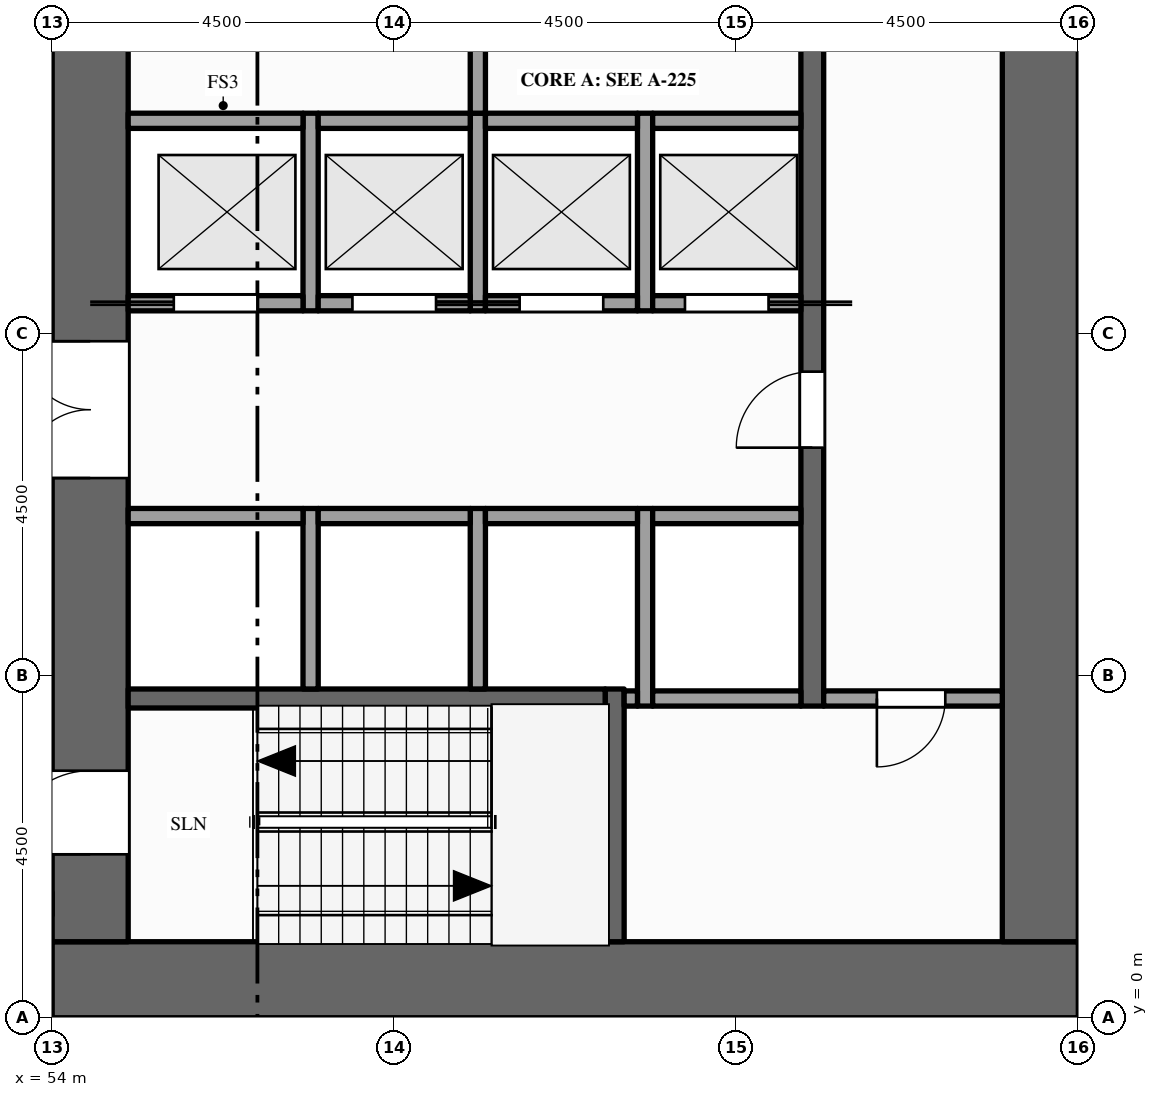
"""IFC4 building model, lengths in metres.
Left out: names, types, materials, properties, quantities, classifications, styles, units other than length and angle.
Written with IfcOpenShell. Run it as: python <this file> out.ifc"""

import sys

from ifc_helpers import new_model, si_unit, direction, frame, frame_2d, origin, place, context, subcontext, project, spatial, rectangle, extrude, element, fill, save


model = new_model("IFC4")
c1 = context("Model", 3, precision=1e-05, world=origin(), true_north=direction((0.0, 1.0)))
c2 = subcontext(c1, "Body", "Model", "MODEL_VIEW")
j1 = project(units=[si_unit("LENGTHUNIT", "METRE"), si_unit("PLANEANGLEUNIT", "RADIAN")], contexts=[c1])
p1 = place(None, origin())
s1 = spatial("IfcSite", under=j1, at=p1, CompositionType="ELEMENT")
p2 = place(p1, origin())
s2 = spatial("IfcBuilding", under=s1, at=p2, CompositionType="ELEMENT")
p3 = place(p2, frame((0.0, 0.0, 139.0)))
s3 = spatial("IfcBuildingStorey", under=s2, at=p3, CompositionType="ELEMENT", Elevation=139.0)
p4 = place(p3, frame((67.5, 0.5, -0.15), z_axis=(0.0, 0.0, 1.0), x_axis=(-1.0, 0.0, 0.0)))
e1 = element("IfcWall", 1, at=p4, inside=s3, PredefinedType="SHEAR", context=c2, shape_type="SweptSolid", body=[
    extrude(rectangle(XDim=13.5, YDim=1.0, at=frame_2d((6.75, 0.0))), origin(), (0.0, 0.0, 1.0), 4.0),
])
p5 = place(p3, frame((54.5, 1.0, -0.15), z_axis=(0.0, 0.0, 1.0), x_axis=(0.0, 1.0, 0.0)))
e2 = element("IfcWall", 2, at=p5, inside=s3, PredefinedType="SHEAR", context=c2, shape_type="SweptSolid", body=[
    extrude(rectangle(XDim=20.5, YDim=1.0, at=frame_2d((10.25, 0.0))), origin(), (0.0, 0.0, 1.0), 4.0),
])
p6 = place(p5, frame((6.1, 0.0, 0.15)))
e3 = element("IfcOpeningElement", 3, at=p6, cuts=e2, PredefinedType="OPENING", context=c2, shape_type="SweptSolid", body=[
    extrude(rectangle(XDim=1.8, YDim=2.1, at=frame_2d((0.9, 1.05))), frame((0.0, 0.51, 0.0), z_axis=(0.0, -1.0, 0.0), x_axis=(1.0, 0.0, 0.0)), (0.0, 0.0, 1.0), 1.02),
])
p7 = place(p5, frame((12.15, 0.0, 0.15)))
e4 = element("IfcOpeningElement", 4, at=p7, cuts=e2, PredefinedType="OPENING", context=c2, shape_type="SweptSolid", body=[
    extrude(rectangle(XDim=1.1, YDim=2.1, at=frame_2d((0.55, 1.05))), frame((0.0, 0.51, 0.0), z_axis=(0.0, -1.0, 0.0), x_axis=(1.0, 0.0, 0.0)), (0.0, 0.0, 1.0), 1.02),
])
p8 = place(p5, frame((1.15, 0.0, 0.15)))
e5 = element("IfcOpeningElement", 5, at=p8, cuts=e2, PredefinedType="OPENING", context=c2, shape_type="SweptSolid", body=[
    extrude(rectangle(XDim=1.1, YDim=2.1, at=frame_2d((0.55, 1.05))), frame((0.0, 0.51, 0.0), z_axis=(0.0, -1.0, 0.0), x_axis=(1.0, 0.0, 0.0)), (0.0, 0.0, 1.0), 1.02),
])
p9 = place(p5, frame((18.35, 0.0, 0.15)))
e6 = element("IfcOpeningElement", 6, at=p9, cuts=e2, PredefinedType="OPENING", context=c2, shape_type="SweptSolid", body=[
    extrude(rectangle(XDim=1.1, YDim=2.1, at=frame_2d((0.55, 1.05))), frame((0.0, 0.51, 0.0), z_axis=(0.0, -1.0, 0.0), x_axis=(1.0, 0.0, 0.0)), (0.0, 0.0, 1.0), 1.02),
])
p10 = place(p3, frame((67.0, 1.0, -0.15), z_axis=(0.0, 0.0, 1.0), x_axis=(0.0, 1.0, 0.0)))
e7 = element("IfcWall", 7, at=p10, inside=s3, PredefinedType="SHEAR", context=c2, shape_type="SweptSolid", body=[
    extrude(rectangle(XDim=20.5, YDim=1.0, at=frame_2d((10.25, 0.0))), origin(), (0.0, 0.0, 1.0), 4.0),
])
p11 = place(p3, frame((57.4, 4.325, 0.0), z_axis=(0.0, 0.0, 1.0), x_axis=(0.0, 1.0, 0.0)))
e8 = element("IfcWall", 8, at=p11, inside=s3, PredefinedType="SOLIDWALL", context=c2, shape_type="SweptSolid", body=[
    extrude(rectangle(XDim=2.375, YDim=0.2, at=frame_2d((1.188, 0.0))), origin(), (0.0, 0.0, 1.0), 3.85),
])
p12 = place(p3, frame((57.4, 9.3, 0.0), z_axis=(0.0, 0.0, 1.0), x_axis=(0.0, 1.0, 0.0)))
e9 = element("IfcWall", 9, at=p12, inside=s3, PredefinedType="SOLIDWALL", context=c2, shape_type="SweptSolid", body=[
    extrude(rectangle(XDim=2.6, YDim=0.2, at=frame_2d((1.3, 0.0))), origin(), (0.0, 0.0, 1.0), 3.85),
])
p13 = place(p3, frame((59.6, 4.325, 0.0), z_axis=(0.0, 0.0, 1.0), x_axis=(0.0, 1.0, 0.0)))
e10 = element("IfcWall", 10, at=p13, inside=s3, PredefinedType="SOLIDWALL", context=c2, shape_type="SweptSolid", body=[
    extrude(rectangle(XDim=2.375, YDim=0.2, at=frame_2d((1.188, 0.0))), origin(), (0.0, 0.0, 1.0), 3.85),
])
p14 = place(p3, frame((59.6, 9.3, 0.0), z_axis=(0.0, 0.0, 1.0), x_axis=(0.0, 1.0, 0.0)))
e11 = element("IfcWall", 11, at=p14, inside=s3, PredefinedType="SOLIDWALL", context=c2, shape_type="SweptSolid", body=[
    extrude(rectangle(XDim=2.6, YDim=0.2, at=frame_2d((1.3, 0.0))), origin(), (0.0, 0.0, 1.0), 3.85),
])
p15 = place(p3, frame((59.6, 11.9, 0.0), z_axis=(0.0, 0.0, 1.0), x_axis=(0.0, 1.0, 0.0)))
e12 = element("IfcWall", 12, at=p15, inside=s3, PredefinedType="PARTITIONING", context=c2, shape_type="SweptSolid", body=[
    extrude(rectangle(XDim=3.6, YDim=0.2, at=frame_2d((1.8, 0.0))), origin(), (0.0, 0.0, 1.0), 3.85),
])
p16 = place(p15, frame((1.3, 0.0, 0.0)))
e13 = element("IfcOpeningElement", 13, at=p16, cuts=e12, PredefinedType="OPENING", context=c2, shape_type="SweptSolid", body=[
    extrude(rectangle(XDim=1.0, YDim=2.1, at=frame_2d((0.5, 1.05))), frame((0.0, 0.11, 0.0), z_axis=(0.0, -1.0, 0.0), x_axis=(1.0, 0.0, 0.0)), (0.0, 0.0, 1.0), 0.22),
])
p17 = place(p3, frame((61.4, 1.0, 0.0), z_axis=(0.0, 0.0, 1.0), x_axis=(0.0, 1.0, 0.0)))
e14 = element("IfcWall", 14, at=p17, inside=s3, PredefinedType="SHEAR", context=c2, shape_type="SweptSolid", body=[
    extrude(rectangle(XDim=3.325, YDim=0.25, at=frame_2d((1.663, 0.0))), origin(), (0.0, 0.0, 1.0), 3.85),
])
for number, where, z_axis, x_axis in (
    (15, (61.8, 4.1, 0.0), (0.0, 0.0, 1.0), (0.0, 1.0, 0.0)),
    (16, (61.8, 9.3, 0.0), (0.0, 0.0, 1.0), (0.0, 1.0, 0.0)),
):
    element("IfcWall", number, at=place(p3, frame(where, z_axis=z_axis, x_axis=x_axis)), inside=s3, PredefinedType="SOLIDWALL", context=c2, shape_type="SweptSolid", body=[
        extrude(rectangle(XDim=2.6, YDim=0.2, at=frame_2d((1.3, 0.0))), origin(), (0.0, 0.0, 1.0), 3.85),
    ])
p18 = place(p3, frame((64.0, 4.1, 0.0), z_axis=(0.0, 0.0, 1.0), x_axis=(0.0, 1.0, 0.0)))
e17 = element("IfcWall", 17, at=p18, inside=s3, PredefinedType="SHEAR", context=c2, shape_type="SweptSolid", body=[
    extrude(rectangle(XDim=14.5, YDim=0.3, at=frame_2d((7.25, 0.0))), origin(), (0.0, 0.0, 1.0), 3.85),
])
p19 = place(p18, frame((3.4, 0.0, 0.0)))
e18 = element("IfcOpeningElement", 18, at=p19, cuts=e17, PredefinedType="OPENING", context=c2, shape_type="SweptSolid", body=[
    extrude(rectangle(XDim=1.0, YDim=2.1, at=frame_2d((0.5, 1.05))), frame((0.0, 0.16, 0.0), z_axis=(0.0, -1.0, 0.0), x_axis=(1.0, 0.0, 0.0)), (0.0, 0.0, 1.0), 0.32),
])
p20 = place(p18, frame((9.1, 0.0, 0.0)))
e19 = element("IfcOpeningElement", 19, at=p20, cuts=e17, PredefinedType="OPENING", context=c2, shape_type="SweptSolid", body=[
    extrude(rectangle(XDim=1.0, YDim=2.1, at=frame_2d((0.5, 1.05))), frame((0.0, 0.16, 0.0), z_axis=(0.0, -1.0, 0.0), x_axis=(1.0, 0.0, 0.0)), (0.0, 0.0, 1.0), 0.32),
])
p21 = place(p3, frame((55.0, 4.2, 0.0), z_axis=(0.0, 0.0, 1.0), x_axis=(1.0, 0.0, 0.0)))
e20 = element("IfcWall", 20, at=p21, inside=s3, PredefinedType="SHEAR", context=c2, shape_type="SweptSolid", body=[
    extrude(rectangle(XDim=6.275, YDim=0.25, at=frame_2d((3.137, 0.0))), origin(), (0.0, 0.0, 1.0), 3.85),
])
p22 = place(p3, frame((61.525, 4.2, 0.0), z_axis=(0.0, 0.0, 1.0), x_axis=(1.0, 0.0, 0.0)))
e21 = element("IfcWall", 21, at=p22, inside=s3, PredefinedType="SOLIDWALL", context=c2, shape_type="SweptSolid", body=[
    extrude(rectangle(XDim=0.175, YDim=0.2, at=frame_2d((0.087, 0.0))), origin(), (0.0, 0.0, 1.0), 3.85),
])
p23 = place(p3, frame((61.9, 4.2, 0.0), z_axis=(0.0, 0.0, 1.0), x_axis=(1.0, 0.0, 0.0)))
e22 = element("IfcWall", 22, at=p23, inside=s3, PredefinedType="SOLIDWALL", context=c2, shape_type="SweptSolid", body=[
    extrude(rectangle(XDim=1.95, YDim=0.2, at=frame_2d((0.975, 0.0))), origin(), (0.0, 0.0, 1.0), 3.85),
])
p24 = place(p3, frame((64.15, 4.2, 0.0), z_axis=(0.0, 0.0, 1.0), x_axis=(1.0, 0.0, 0.0)))
e23 = element("IfcWall", 23, at=p24, inside=s3, PredefinedType="PARTITIONING", context=c2, shape_type="SweptSolid", body=[
    extrude(rectangle(XDim=2.35, YDim=0.2, at=frame_2d((1.175, 0.0))), origin(), (0.0, 0.0, 1.0), 3.85),
])
p25 = place(p24, frame((0.7, 0.0, 0.0)))
e24 = element("IfcOpeningElement", 24, at=p25, cuts=e23, PredefinedType="OPENING", context=c2, shape_type="SweptSolid", body=[
    extrude(rectangle(XDim=0.9, YDim=2.1, at=frame_2d((0.45, 1.05))), frame((0.0, 0.11, 0.0), z_axis=(0.0, -1.0, 0.0), x_axis=(1.0, 0.0, 0.0)), (0.0, 0.0, 1.0), 0.22),
])
p26 = place(p3, frame((55.0, 6.6, 0.0), z_axis=(0.0, 0.0, 1.0), x_axis=(1.0, 0.0, 0.0)))
e25 = element("IfcWall", 25, at=p26, inside=s3, PredefinedType="SOLIDWALL", context=c2, shape_type="SweptSolid", body=[
    extrude(rectangle(XDim=2.3, YDim=0.2, at=frame_2d((1.15, 0.0))), origin(), (0.0, 0.0, 1.0), 3.85),
])
for number, where, z_axis, x_axis in (
    (26, (57.5, 6.6, 0.0), (0.0, 0.0, 1.0), (1.0, 0.0, 0.0)),
    (27, (59.7, 6.6, 0.0), (0.0, 0.0, 1.0), (1.0, 0.0, 0.0)),
):
    element("IfcWall", number, at=place(p3, frame(where, z_axis=z_axis, x_axis=x_axis)), inside=s3, PredefinedType="SOLIDWALL", context=c2, shape_type="SweptSolid", body=[
        extrude(rectangle(XDim=2.0, YDim=0.2, at=frame_2d((1.0, 0.0))), origin(), (0.0, 0.0, 1.0), 3.85),
    ])
p27 = place(p3, frame((61.9, 6.6, 0.0), z_axis=(0.0, 0.0, 1.0), x_axis=(1.0, 0.0, 0.0)))
e28 = element("IfcWall", 28, at=p27, inside=s3, PredefinedType="SOLIDWALL", context=c2, shape_type="SweptSolid", body=[
    extrude(rectangle(XDim=1.95, YDim=0.2, at=frame_2d((0.975, 0.0))), origin(), (0.0, 0.0, 1.0), 3.85),
])
p28 = place(p3, frame((55.0, 9.4, 0.0), z_axis=(0.0, 0.0, 1.0), x_axis=(1.0, 0.0, 0.0)))
e29 = element("IfcWall", 29, at=p28, inside=s3, PredefinedType="SOLIDWALL", context=c2, shape_type="SweptSolid", body=[
    extrude(rectangle(XDim=2.3, YDim=0.2, at=frame_2d((1.15, 0.0))), origin(), (0.0, 0.0, 1.0), 3.85),
])
p29 = place(p28, frame((0.6, 0.0, 0.012)))
e30 = element("IfcOpeningElement", 30, at=p29, cuts=e29, PredefinedType="OPENING", context=c2, shape_type="SweptSolid", body=[
    extrude(rectangle(XDim=1.1, YDim=2.1, at=frame_2d((0.55, 1.05))), frame((0.0, 0.11, 0.0), z_axis=(0.0, -1.0, 0.0), x_axis=(1.0, 0.0, 0.0)), (0.0, 0.0, 1.0), 0.22),
])
p30 = place(p3, frame((57.5, 9.4, 0.0), z_axis=(0.0, 0.0, 1.0), x_axis=(1.0, 0.0, 0.0)))
e31 = element("IfcWall", 31, at=p30, inside=s3, PredefinedType="SOLIDWALL", context=c2, shape_type="SweptSolid", body=[
    extrude(rectangle(XDim=2.0, YDim=0.2, at=frame_2d((1.0, 0.0))), origin(), (0.0, 0.0, 1.0), 3.85),
])
p31 = place(p30, frame((0.45, 0.0, 0.012)))
e32 = element("IfcOpeningElement", 32, at=p31, cuts=e31, PredefinedType="OPENING", context=c2, shape_type="SweptSolid", body=[
    extrude(rectangle(XDim=1.1, YDim=2.1, at=frame_2d((0.55, 1.05))), frame((0.0, 0.11, 0.0), z_axis=(0.0, -1.0, 0.0), x_axis=(1.0, 0.0, 0.0)), (0.0, 0.0, 1.0), 0.22),
])
p32 = place(p3, frame((59.7, 9.4, 0.0), z_axis=(0.0, 0.0, 1.0), x_axis=(1.0, 0.0, 0.0)))
e33 = element("IfcWall", 33, at=p32, inside=s3, PredefinedType="SOLIDWALL", context=c2, shape_type="SweptSolid", body=[
    extrude(rectangle(XDim=2.0, YDim=0.2, at=frame_2d((1.0, 0.0))), origin(), (0.0, 0.0, 1.0), 3.85),
])
p33 = place(p32, frame((0.45, 0.0, 0.012)))
e34 = element("IfcOpeningElement", 34, at=p33, cuts=e33, PredefinedType="OPENING", context=c2, shape_type="SweptSolid", body=[
    extrude(rectangle(XDim=1.1, YDim=2.1, at=frame_2d((0.55, 1.05))), frame((0.0, 0.11, 0.0), z_axis=(0.0, -1.0, 0.0), x_axis=(1.0, 0.0, 0.0)), (0.0, 0.0, 1.0), 0.22),
])
p34 = place(p3, frame((61.9, 9.4, 0.0), z_axis=(0.0, 0.0, 1.0), x_axis=(1.0, 0.0, 0.0)))
e35 = element("IfcWall", 35, at=p34, inside=s3, PredefinedType="SOLIDWALL", context=c2, shape_type="SweptSolid", body=[
    extrude(rectangle(XDim=1.95, YDim=0.2, at=frame_2d((0.975, 0.0))), origin(), (0.0, 0.0, 1.0), 3.85),
])
p35 = place(p34, frame((0.425, 0.0, 0.012)))
e36 = element("IfcOpeningElement", 36, at=p35, cuts=e35, PredefinedType="OPENING", context=c2, shape_type="SweptSolid", body=[
    extrude(rectangle(XDim=1.1, YDim=2.1, at=frame_2d((0.55, 1.05))), frame((0.0, 0.11, 0.0), z_axis=(0.0, -1.0, 0.0), x_axis=(1.0, 0.0, 0.0)), (0.0, 0.0, 1.0), 0.22),
])
p36 = place(p3, frame((55.0, 11.8, 0.0), z_axis=(0.0, 0.0, 1.0), x_axis=(1.0, 0.0, 0.0)))
e37 = element("IfcWall", 37, at=p36, inside=s3, PredefinedType="SOLIDWALL", context=c2, shape_type="SweptSolid", body=[
    extrude(rectangle(XDim=2.3, YDim=0.2, at=frame_2d((1.15, 0.0))), origin(), (0.0, 0.0, 1.0), 3.85),
])
for number, where, z_axis, x_axis in (
    (38, (57.5, 11.8, 0.0), (0.0, 0.0, 1.0), (1.0, 0.0, 0.0)),
    (39, (59.7, 11.8, 0.0), (0.0, 0.0, 1.0), (1.0, 0.0, 0.0)),
):
    element("IfcWall", number, at=place(p3, frame(where, z_axis=z_axis, x_axis=x_axis)), inside=s3, PredefinedType="SOLIDWALL", context=c2, shape_type="SweptSolid", body=[
        extrude(rectangle(XDim=2.0, YDim=0.2, at=frame_2d((1.0, 0.0))), origin(), (0.0, 0.0, 1.0), 3.85),
    ])
p37 = place(p3, frame((61.9, 11.8, 0.0), z_axis=(0.0, 0.0, 1.0), x_axis=(1.0, 0.0, 0.0)))
e40 = element("IfcWall", 40, at=p37, inside=s3, PredefinedType="SOLIDWALL", context=c2, shape_type="SweptSolid", body=[
    extrude(rectangle(XDim=1.95, YDim=0.2, at=frame_2d((0.975, 0.0))), origin(), (0.0, 0.0, 1.0), 3.85),
])
p38 = place(p29, origin())
e41 = element("IfcDoor", 41, at=p38, inside=s3, OperationType="SLIDING_TO_LEFT", PredefinedType="DOOR", context=c2, shape_type="SweptSolid", body=[
    extrude(rectangle(XDim=1.1, YDim=2.1, at=frame_2d((0.55, 1.05))), frame((0.0, 0.025, 0.0), z_axis=(0.0, -1.0, 0.0), x_axis=(1.0, 0.0, 0.0)), (0.0, 0.0, 1.0), 0.05),
])
fill(e30, e41)
p39 = place(p31, origin())
e42 = element("IfcDoor", 42, at=p39, inside=s3, OperationType="SLIDING_TO_RIGHT", PredefinedType="DOOR", context=c2, shape_type="SweptSolid", body=[
    extrude(rectangle(XDim=1.1, YDim=2.1, at=frame_2d((0.55, 1.05))), frame((0.0, 0.025, 0.0), z_axis=(0.0, -1.0, 0.0), x_axis=(1.0, 0.0, 0.0)), (0.0, 0.0, 1.0), 0.05),
])
fill(e32, e42)
p40 = place(p33, origin())
e43 = element("IfcDoor", 43, at=p40, inside=s3, OperationType="SLIDING_TO_LEFT", PredefinedType="DOOR", context=c2, shape_type="SweptSolid", body=[
    extrude(rectangle(XDim=1.1, YDim=2.1, at=frame_2d((0.55, 1.05))), frame((0.0, 0.025, 0.0), z_axis=(0.0, -1.0, 0.0), x_axis=(1.0, 0.0, 0.0)), (0.0, 0.0, 1.0), 0.05),
])
fill(e34, e43)
p41 = place(p35, origin())
e44 = element("IfcDoor", 44, at=p41, inside=s3, OperationType="SLIDING_TO_RIGHT", PredefinedType="DOOR", context=c2, shape_type="SweptSolid", body=[
    extrude(rectangle(XDim=1.1, YDim=2.1, at=frame_2d((0.55, 1.05))), frame((0.0, 0.025, 0.0), z_axis=(0.0, -1.0, 0.0), x_axis=(1.0, 0.0, 0.0)), (0.0, 0.0, 1.0), 0.05),
])
fill(e36, e44)
p42 = place(p6, origin())
e45 = element("IfcDoor", 45, at=p42, inside=s3, OperationType="DOUBLE_DOOR_SINGLE_SWING", PredefinedType="DOOR", context=c2, shape_type="SweptSolid", body=[
    extrude(rectangle(XDim=1.8, YDim=2.1, at=frame_2d((0.9, 1.05))), frame((0.0, 0.025, 0.0), z_axis=(0.0, -1.0, 0.0), x_axis=(1.0, 0.0, 0.0)), (0.0, 0.0, 1.0), 0.05),
])
fill(e3, e45)
p43 = place(p19, origin())
e46 = element("IfcDoor", 46, at=p43, inside=s3, OperationType="SINGLE_SWING_LEFT", PredefinedType="DOOR", context=c2, shape_type="SweptSolid", body=[
    extrude(rectangle(XDim=1.0, YDim=2.1, at=frame_2d((0.5, 1.05))), frame((0.0, 0.025, 0.0), z_axis=(0.0, -1.0, 0.0), x_axis=(1.0, 0.0, 0.0)), (0.0, 0.0, 1.0), 0.05),
])
fill(e18, e46)
p44 = place(p8, origin())
e47 = element("IfcDoor", 47, at=p44, inside=s3, OperationType="SINGLE_SWING_LEFT", PredefinedType="DOOR", context=c2, shape_type="SweptSolid", body=[
    extrude(rectangle(XDim=1.1, YDim=2.1, at=frame_2d((0.55, 1.05))), frame((0.0, 0.025, 0.0), z_axis=(0.0, -1.0, 0.0), x_axis=(1.0, 0.0, 0.0)), (0.0, 0.0, 1.0), 0.05),
])
fill(e5, e47)
p45 = place(p25, origin())
e48 = element("IfcDoor", 48, at=p45, inside=s3, OperationType="SINGLE_SWING_LEFT", PredefinedType="DOOR", context=c2, shape_type="SweptSolid", body=[
    extrude(rectangle(XDim=0.9, YDim=2.1, at=frame_2d((0.45, 1.05))), frame((0.0, 0.025, 0.0), z_axis=(0.0, -1.0, 0.0), x_axis=(1.0, 0.0, 0.0)), (0.0, 0.0, 1.0), 0.05),
])
fill(e24, e48)
save(model, sys.argv[1])
